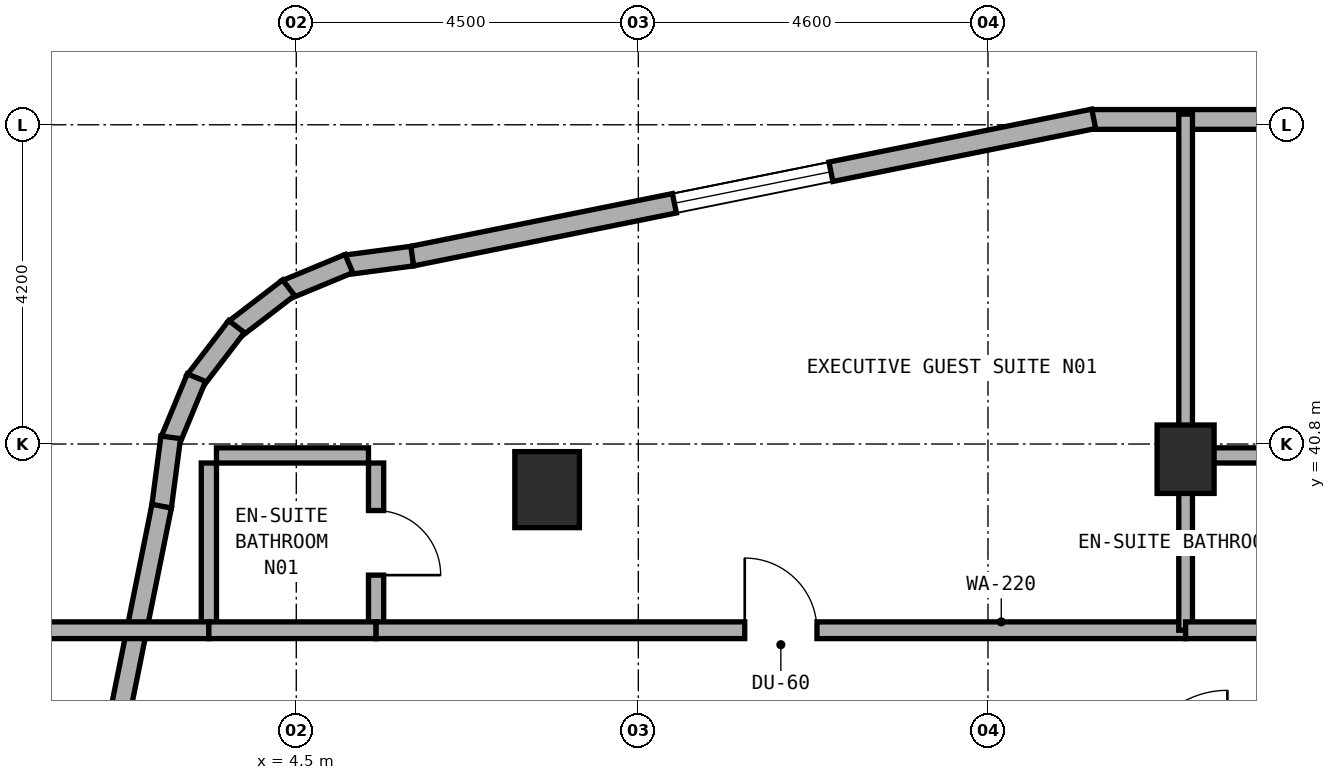
"""IFC4 building model, lengths in metres.
Left out: names, types, materials, properties, quantities, classifications, styles, units other than length and angle.
Written with IfcOpenShell. Run it as: python <this file> out.ifc"""

import sys

from ifc_helpers import new_model, si_unit, direction, frame, frame_2d, origin, origin_2d, place, context, subcontext, project, spatial, rectangle, extrude, element, fill, save


model = new_model("IFC4")
c1 = context("Model", 3, precision=1e-05, world=origin(), true_north=direction((0.0, 1.0)))
c2 = subcontext(c1, "Body", "Model", "MODEL_VIEW")
j1 = project(units=[si_unit("LENGTHUNIT", "METRE"), si_unit("PLANEANGLEUNIT", "RADIAN")], contexts=[c1])
p1 = place(None, origin())
s1 = spatial("IfcSite", under=j1, at=p1, CompositionType="ELEMENT")
p2 = place(p1, origin())
s2 = spatial("IfcBuilding", under=s1, at=p2, CompositionType="ELEMENT")
p3 = place(p2, frame((0.0, 0.0, 155.5)))
s3 = spatial("IfcBuildingStorey", under=s2, at=p3, CompositionType="ELEMENT", Elevation=155.5)
p4 = place(p3, frame((16.2, 40.6, 0.0), z_axis=(0.0, 0.0, 1.0), x_axis=(1.0, 0.0, 0.0)))
e1 = element("IfcColumn", 1, at=p4, inside=s3, PredefinedType="COLUMN", context=c2, shape_type="SweptSolid", body=[
    extrude(rectangle(XDim=0.75, YDim=0.9, at=origin_2d()), origin(), (0.0, 0.0, 1.0), 3.5),
])
p5 = place(p3, frame((7.8, 40.2, 0.0), z_axis=(0.0, 0.0, 1.0), x_axis=(1.0, 0.0, 0.0)))
e2 = element("IfcColumn", 2, at=p5, inside=s3, PredefinedType="COLUMN", context=c2, shape_type="SweptSolid", body=[
    extrude(rectangle(XDim=0.85, YDim=1.0, at=origin_2d()), origin(), (0.0, 0.0, 1.0), 3.5),
])
p6 = place(p3, frame((27.085, 45.07, 0.0), z_axis=(0.0, 0.0, 1.0), x_axis=(-1.0, 0.0, 0.0)))
e3 = element("IfcWall", 3, at=p6, inside=s3, PredefinedType="STANDARD", context=c2, shape_type="SweptSolid", body=[
    extrude(rectangle(XDim=12.135, YDim=0.26, at=frame_2d((6.067, 0.0))), origin(), (0.0, 0.0, 1.0), 3.22),
])
p7 = place(p6, frame((5.485, 0.0, 0.0)))
e4 = element("IfcOpeningElement", 4, at=p7, cuts=e3, PredefinedType="OPENING", context=c2, shape_type="SweptSolid", body=[
    extrude(rectangle(XDim=1.2, YDim=2.15, at=frame_2d((0.6, 1.075))), frame((0.0, 0.14, 0.0), z_axis=(0.0, -1.0, 0.0), x_axis=(1.0, 0.0, 0.0)), (0.0, 0.0, 1.0), 0.28),
])
p8 = place(p6, frame((2.26, 0.0, 0.85)))
e5 = element("IfcOpeningElement", 5, at=p8, cuts=e3, PredefinedType="OPENING", context=c2, shape_type="SweptSolid", body=[
    extrude(rectangle(XDim=2.1, YDim=1.5, at=frame_2d((1.05, 0.75))), frame((0.0, 0.14, 0.0), z_axis=(0.0, -1.0, 0.0), x_axis=(1.0, 0.0, 0.0)), (0.0, 0.0, 1.0), 0.28),
])
p9 = place(p6, frame((7.81, 0.0, 0.85)))
e6 = element("IfcOpeningElement", 6, at=p9, cuts=e3, PredefinedType="OPENING", context=c2, shape_type="SweptSolid", body=[
    extrude(rectangle(XDim=2.1, YDim=1.5, at=frame_2d((1.05, 0.75))), frame((0.0, 0.14, 0.0), z_axis=(0.0, -1.0, 0.0), x_axis=(1.0, 0.0, 0.0)), (0.0, 0.0, 1.0), 0.28),
])
p10 = place(p3, frame((14.991, 45.078, 0.0), z_axis=(0.0, 0.0, 1.0), x_axis=(-0.980321298532, -0.197408590603, 0.0)))
e7 = element("IfcWall", 7, at=p10, inside=s3, PredefinedType="STANDARD", context=c2, shape_type="SweptSolid", body=[
    extrude(rectangle(XDim=9.153, YDim=0.26, at=frame_2d((4.577, 0.0))), origin(), (0.0, 0.0, 1.0), 3.22),
])
p11 = place(p10, frame((3.527, 0.0, 0.85)))
e8 = element("IfcOpeningElement", 8, at=p11, cuts=e7, PredefinedType="OPENING", context=c2, shape_type="SweptSolid", body=[
    extrude(rectangle(XDim=2.1, YDim=1.5, at=frame_2d((1.05, 0.75))), frame((0.0, 0.14, 0.0), z_axis=(0.0, -1.0, 0.0), x_axis=(1.0, 0.0, 0.0)), (0.0, 0.0, 1.0), 0.28),
])
p12 = place(p3, frame((6.025, 43.272, 0.0), z_axis=(0.0, 0.0, 1.0), x_axis=(-0.991388484223, -0.130953706898, 0.0)))
e9 = element("IfcWall", 9, at=p12, inside=s3, PredefinedType="STANDARD", context=c2, shape_type="SweptSolid", body=[
    extrude(rectangle(XDim=0.885, YDim=0.26, at=frame_2d((0.443, 0.0))), origin(), (0.0, 0.0, 1.0), 3.22),
])
p13 = place(p3, frame((5.193, 43.174, 0.0), z_axis=(0.0, 0.0, 1.0), x_axis=(-0.923627776508, -0.383290660547, 0.0)))
e10 = element("IfcWall", 10, at=p13, inside=s3, PredefinedType="STANDARD", context=c2, shape_type="SweptSolid", body=[
    extrude(rectangle(XDim=0.903, YDim=0.26, at=frame_2d((0.452, 0.0))), origin(), (0.0, 0.0, 1.0), 3.22),
])
p14 = place(p3, frame((4.399, 42.856, 0.0), z_axis=(0.0, 0.0, 1.0), x_axis=(-0.793458244748, -0.608624690463, 0.0)))
e11 = element("IfcWall", 11, at=p14, inside=s3, PredefinedType="STANDARD", context=c2, shape_type="SweptSolid", body=[
    extrude(rectangle(XDim=0.902, YDim=0.26, at=frame_2d((0.451, 0.0))), origin(), (0.0, 0.0, 1.0), 3.22),
])
p15 = place(p3, frame((3.714, 42.345, 0.0), z_axis=(0.0, 0.0, 1.0), x_axis=(-0.608494022858, -0.793558456666, 0.0)))
e12 = element("IfcWall", 12, at=p15, inside=s3, PredefinedType="STANDARD", context=c2, shape_type="SweptSolid", body=[
    extrude(rectangle(XDim=0.902, YDim=0.26, at=frame_2d((0.451, 0.0))), origin(), (0.0, 0.0, 1.0), 3.22),
])
p16 = place(p3, frame((3.186, 41.673, 0.0), z_axis=(0.0, 0.0, 1.0), x_axis=(-0.383155708213, -0.923683767999, 0.0)))
e13 = element("IfcWall", 13, at=p16, inside=s3, PredefinedType="STANDARD", context=c2, shape_type="SweptSolid", body=[
    extrude(rectangle(XDim=0.903, YDim=0.26, at=frame_2d((0.451, 0.0))), origin(), (0.0, 0.0, 1.0), 3.22),
])
p17 = place(p3, frame((2.848, 40.888, 0.0), z_axis=(0.0, 0.0, 1.0), x_axis=(-0.130200706103, -0.991487658083, 0.0)))
e14 = element("IfcWall", 14, at=p17, inside=s3, PredefinedType="STANDARD", context=c2, shape_type="SweptSolid", body=[
    extrude(rectangle(XDim=0.921, YDim=0.26, at=frame_2d((0.46, 0.0))), origin(), (0.0, 0.0, 1.0), 3.22),
])
p18 = place(p3, frame((2.729, 39.982, 0.0), z_axis=(0.0, 0.0, 1.0), x_axis=(-0.197435082048, -0.980315963543, 0.0)))
e15 = element("IfcWall", 15, at=p18, inside=s3, PredefinedType="STANDARD", context=c2, shape_type="SweptSolid", body=[
    extrude(rectangle(XDim=9.183, YDim=0.26, at=frame_2d((4.591, 0.0))), origin(), (0.0, 0.0, 1.0), 3.22),
])
p19 = place(p18, frame((4.436, 0.0, 0.85)))
e16 = element("IfcOpeningElement", 16, at=p19, cuts=e15, PredefinedType="OPENING", context=c2, shape_type="SweptSolid", body=[
    extrude(rectangle(XDim=2.1, YDim=1.5, at=frame_2d((1.05, 0.75))), frame((0.0, 0.14, 0.0), z_axis=(0.0, -1.0, 0.0), x_axis=(1.0, 0.0, 0.0)), (0.0, 0.0, 1.0), 0.28),
])
p20 = place(p3, frame((5.55, 38.45, 0.0), z_axis=(0.0, 0.0, 1.0), x_axis=(0.0, 1.0, 0.0)))
e17 = element("IfcWall", 17, at=p20, inside=s3, PredefinedType="PLUMBINGWALL", context=c2, shape_type="SweptSolid", body=[
    extrude(rectangle(XDim=2.1, YDim=0.2, at=frame_2d((1.05, 0.0))), origin(), (0.0, 0.0, 1.0), 3.22),
])
p21 = place(p20, frame((0.625, 0.0, 0.0)))
e18 = element("IfcOpeningElement", 18, at=p21, cuts=e17, PredefinedType="OPENING", context=c2, shape_type="SweptSolid", body=[
    extrude(rectangle(XDim=0.85, YDim=2.1, at=frame_2d((0.425, 1.05))), frame((0.0, 0.11, 0.0), z_axis=(0.0, -1.0, 0.0), x_axis=(1.0, 0.0, 0.0)), (0.0, 0.0, 1.0), 0.22),
])
p22 = place(p3, frame((3.45, 40.65, 0.0), z_axis=(0.0, 0.0, 1.0), x_axis=(1.0, 0.0, 0.0)))
e19 = element("IfcWall", 19, at=p22, inside=s3, PredefinedType="PLUMBINGWALL", context=c2, shape_type="SweptSolid", body=[
    extrude(rectangle(XDim=2.0, YDim=0.2, at=frame_2d((1.0, 0.0))), origin(), (0.0, 0.0, 1.0), 3.22),
])
p23 = place(p3, frame((3.35, 38.45, 0.0), z_axis=(0.0, 0.0, 1.0), x_axis=(0.0, 1.0, 0.0)))
e20 = element("IfcWall", 20, at=p23, inside=s3, PredefinedType="PLUMBINGWALL", context=c2, shape_type="SweptSolid", body=[
    extrude(rectangle(XDim=2.1, YDim=0.2, at=frame_2d((1.05, 0.0))), origin(), (0.0, 0.0, 1.0), 3.22),
])
p24 = place(p3, frame((0.96, 38.35, 0.0), z_axis=(0.0, 0.0, 1.0), x_axis=(1.0, 0.0, 0.0)))
e21 = element("IfcWall", 21, at=p24, inside=s3, PredefinedType="SOLIDWALL", context=c2, shape_type="SweptSolid", body=[
    extrude(rectangle(XDim=2.39, YDim=0.22, at=frame_2d((1.195, 0.0))), origin(), (0.0, 0.0, 1.0), 3.22),
])
p25 = place(p3, frame((3.35, 38.35, 0.0), z_axis=(0.0, 0.0, 1.0), x_axis=(1.0, 0.0, 0.0)))
e22 = element("IfcWall", 22, at=p25, inside=s3, PredefinedType="SOLIDWALL", context=c2, shape_type="SweptSolid", body=[
    extrude(rectangle(XDim=2.2, YDim=0.22, at=frame_2d((1.1, 0.0))), origin(), (0.0, 0.0, 1.0), 3.22),
])
p26 = place(p3, frame((5.55, 38.35, 0.0), z_axis=(0.0, 0.0, 1.0), x_axis=(1.0, 0.0, 0.0)))
e23 = element("IfcWall", 23, at=p26, inside=s3, PredefinedType="SOLIDWALL", context=c2, shape_type="SweptSolid", body=[
    extrude(rectangle(XDim=10.65, YDim=0.22, at=frame_2d((5.325, 0.0))), origin(), (0.0, 0.0, 1.0), 2.795),
])
p27 = place(p26, frame((4.85, 0.0, 0.0)))
e24 = element("IfcOpeningElement", 24, at=p27, cuts=e23, PredefinedType="OPENING", context=c2, shape_type="SweptSolid", body=[
    extrude(rectangle(XDim=0.95, YDim=2.1, at=frame_2d((0.475, 1.05))), frame((0.0, 0.12, 0.0), z_axis=(0.0, -1.0, 0.0), x_axis=(1.0, 0.0, 0.0)), (0.0, 0.0, 1.0), 0.24),
])
p28 = place(p3, frame((16.2, 38.35, 0.0), z_axis=(0.0, 0.0, 1.0), x_axis=(0.0, 1.0, 0.0)))
e25 = element("IfcWall", 25, at=p28, inside=s3, PredefinedType="SOLIDWALL", context=c2, shape_type="SweptSolid", body=[
    extrude(rectangle(XDim=6.79, YDim=0.18, at=frame_2d((3.395, 0.0))), origin(), (0.0, 0.0, 1.0), 2.795),
])
p29 = place(p3, frame((16.3, 40.65, 0.0), z_axis=(0.0, 0.0, 1.0), x_axis=(1.0, 0.0, 0.0)))
e26 = element("IfcWall", 26, at=p29, inside=s3, PredefinedType="PLUMBINGWALL", context=c2, shape_type="SweptSolid", body=[
    extrude(rectangle(XDim=2.0, YDim=0.2, at=frame_2d((1.0, 0.0))), origin(), (0.0, 0.0, 1.0), 2.835),
])
p30 = place(p3, frame((16.2, 38.35, 0.0), z_axis=(0.0, 0.0, 1.0), x_axis=(1.0, 0.0, 0.0)))
e27 = element("IfcWall", 27, at=p30, inside=s3, PredefinedType="SOLIDWALL", context=c2, shape_type="SweptSolid", body=[
    extrude(rectangle(XDim=2.2, YDim=0.22, at=frame_2d((1.1, 0.0))), origin(), (0.0, 0.0, 1.0), 2.795),
])
p31 = place(p11, origin())
e28 = element("IfcWindow", 28, at=p31, inside=s3, PartitioningType="SINGLE_PANEL", PredefinedType="WINDOW", context=c2, shape_type="SweptSolid", body=[
    extrude(rectangle(XDim=2.1, YDim=1.5, at=frame_2d((1.05, 0.75))), frame((0.0, 0.03, 0.0), z_axis=(0.0, -1.0, 0.0), x_axis=(1.0, 0.0, 0.0)), (0.0, 0.0, 1.0), 0.06),
])
fill(e8, e28)
p32 = place(p21, frame((0.85, 0.0, 0.0), z_axis=(0.0, 0.0, 1.0), x_axis=(-1.0, 0.0, 0.0)))
e29 = element("IfcDoor", 29, at=p32, inside=s3, OperationType="SINGLE_SWING_RIGHT", PredefinedType="DOOR", context=c2, shape_type="SweptSolid", body=[
    extrude(rectangle(XDim=0.85, YDim=2.1, at=frame_2d((0.425, 1.05))), frame((0.0, 0.025, 0.0), z_axis=(0.0, -1.0, 0.0), x_axis=(1.0, 0.0, 0.0)), (0.0, 0.0, 1.0), 0.05),
])
fill(e18, e29)
p33 = place(p27, origin())
e30 = element("IfcDoor", 30, at=p33, inside=s3, OperationType="SINGLE_SWING_LEFT", PredefinedType="DOOR", context=c2, shape_type="SweptSolid", body=[
    extrude(rectangle(XDim=0.95, YDim=2.1, at=frame_2d((0.475, 1.05))), frame((0.0, 0.025, 0.0), z_axis=(0.0, -1.0, 0.0), x_axis=(1.0, 0.0, 0.0)), (0.0, 0.0, 1.0), 0.05),
])
fill(e24, e30)
save(model, sys.argv[1])
